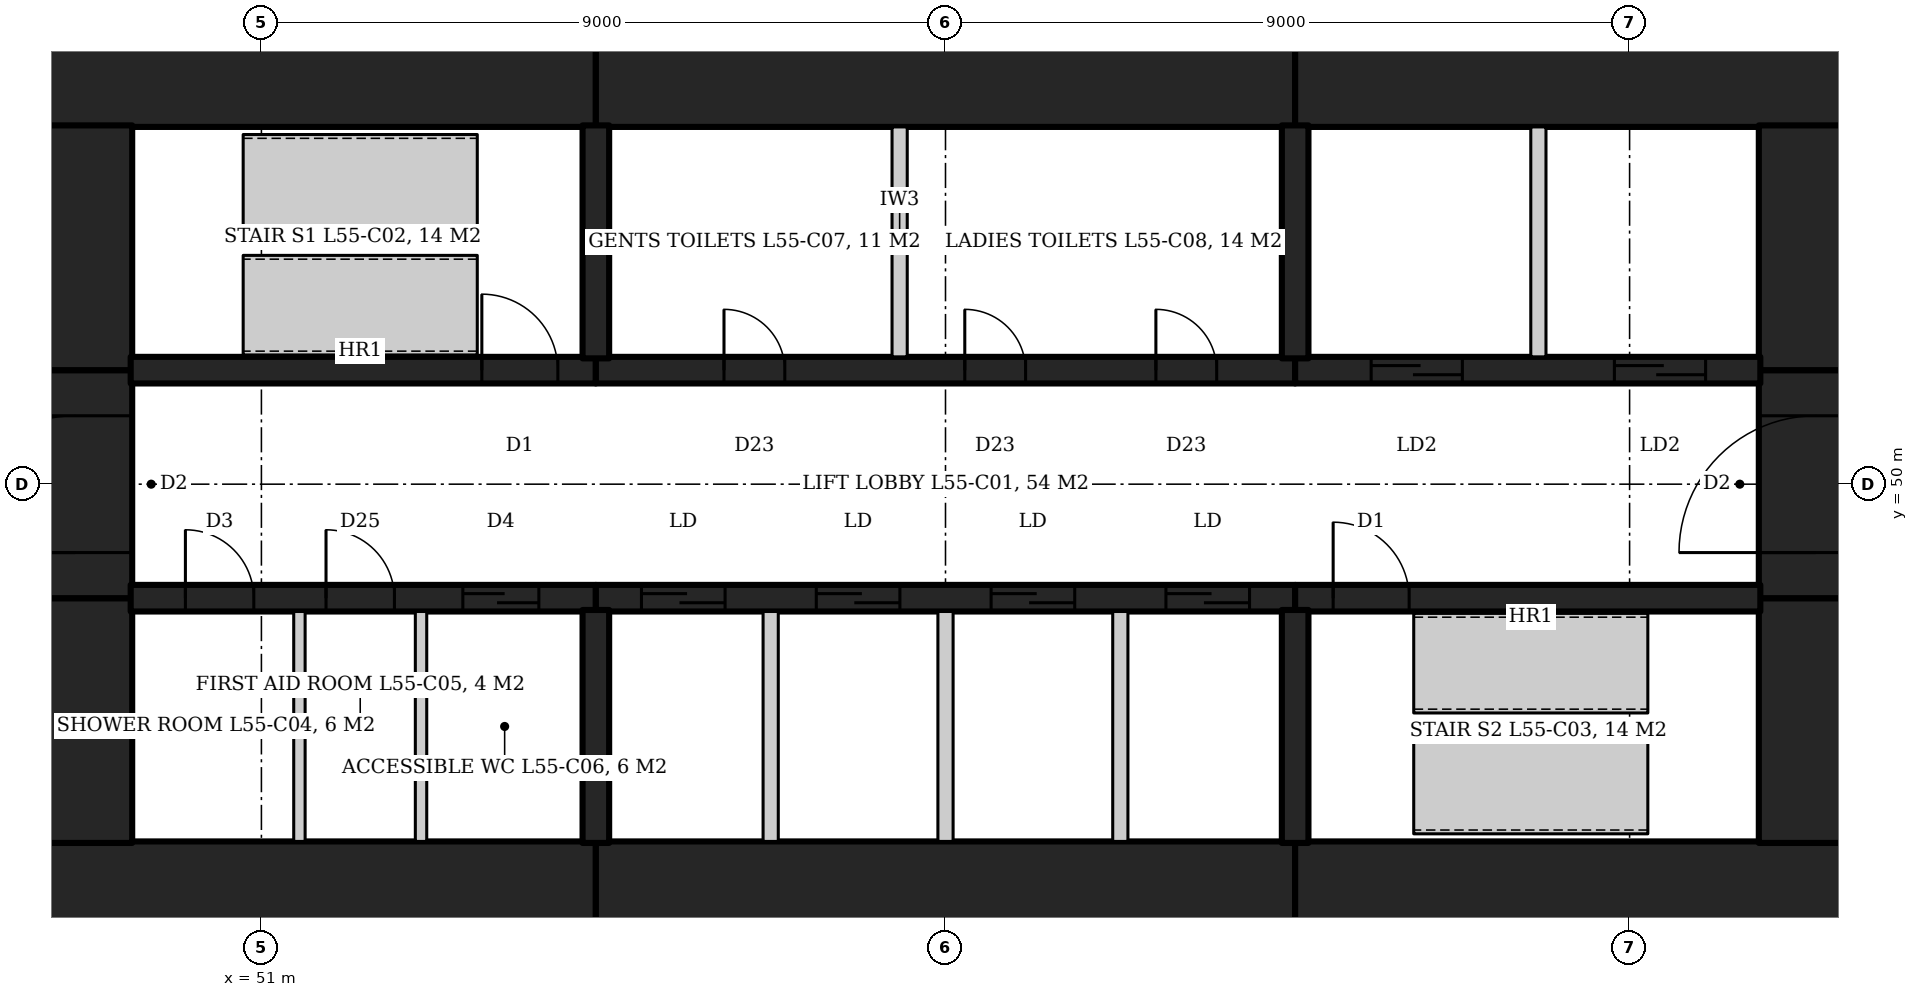
"""IFC4 building model, lengths in metres.
Left out: names, types, materials, properties, quantities, classifications, styles, units other than length and angle.
Written with IfcOpenShell. Run it as: python <this file> out.ifc"""

import sys

from ifc_helpers import new_model, si_unit, direction, frame, frame_2d, origin, place, context, subcontext, project, spatial, rectangle, extrude, element, fill, save


model = new_model("IFC4")
c1 = context("Model", 3, precision=1e-05, world=origin(), true_north=direction((0.0, 1.0)))
c2 = subcontext(c1, "Body", "Model", "MODEL_VIEW")
j1 = project(units=[si_unit("LENGTHUNIT", "METRE"), si_unit("PLANEANGLEUNIT", "RADIAN")], contexts=[c1])
p1 = place(None, origin())
s1 = spatial("IfcSite", under=j1, at=p1, CompositionType="ELEMENT")
p2 = place(p1, origin())
s2 = spatial("IfcBuilding", under=s1, at=p2, CompositionType="ELEMENT")
p3 = place(p2, frame((0.0, 0.0, 240.2)))
s3 = spatial("IfcBuildingStorey", under=s2, at=p3, CompositionType="ELEMENT", Elevation=240.2)
p4 = place(p3, frame((47.8, 55.45, 0.0), z_axis=(0.0, 0.0, 1.0), x_axis=(1.0, 0.0, 0.0)))
e1 = element("IfcWall", 1, at=p4, inside=s3, PredefinedType="SHEAR", context=c2, shape_type="SweptSolid", body=[
    extrude(rectangle(XDim=7.6, YDim=1.5, at=frame_2d((3.8, 0.0))), origin(), (0.0, 0.0, 1.0), 4.2),
])
p5 = place(p3, frame((55.4, 55.45, 0.0), z_axis=(0.0, 0.0, 1.0), x_axis=(1.0, 0.0, 0.0)))
e2 = element("IfcWall", 2, at=p5, inside=s3, PredefinedType="SHEAR", context=c2, shape_type="SweptSolid", body=[
    extrude(rectangle(XDim=9.2, YDim=1.5, at=frame_2d((4.6, 0.0))), origin(), (0.0, 0.0, 1.0), 4.2),
])
for number, where, z_axis, x_axis in (
    (3, (64.6, 55.45, 0.0), (0.0, 0.0, 1.0), (1.0, 0.0, 0.0)),
    (4, (47.8, 44.55, 0.0), (0.0, 0.0, 1.0), (1.0, 0.0, 0.0)),
):
    element("IfcWall", number, at=place(p3, frame(where, z_axis=z_axis, x_axis=x_axis)), inside=s3, PredefinedType="SHEAR", context=c2, shape_type="SweptSolid", body=[
        extrude(rectangle(XDim=7.6, YDim=1.5, at=frame_2d((3.8, 0.0))), origin(), (0.0, 0.0, 1.0), 4.2),
    ])
p6 = place(p3, frame((55.4, 44.55, 0.0), z_axis=(0.0, 0.0, 1.0), x_axis=(1.0, 0.0, 0.0)))
e5 = element("IfcWall", 5, at=p6, inside=s3, PredefinedType="SHEAR", context=c2, shape_type="SweptSolid", body=[
    extrude(rectangle(XDim=9.2, YDim=1.5, at=frame_2d((4.6, 0.0))), origin(), (0.0, 0.0, 1.0), 4.2),
])
p7 = place(p3, frame((64.6, 44.55, 0.0), z_axis=(0.0, 0.0, 1.0), x_axis=(1.0, 0.0, 0.0)))
e6 = element("IfcWall", 6, at=p7, inside=s3, PredefinedType="SHEAR", context=c2, shape_type="SweptSolid", body=[
    extrude(rectangle(XDim=7.6, YDim=1.5, at=frame_2d((3.8, 0.0))), origin(), (0.0, 0.0, 1.0), 4.2),
])
p8 = place(p3, frame((71.45, 45.28, 0.0), z_axis=(0.0, 0.0, 1.0), x_axis=(0.0, 1.0, 0.0)))
e7 = element("IfcWall", 7, at=p8, inside=s3, PredefinedType="SHEAR", context=c2, shape_type="SweptSolid", body=[
    extrude(rectangle(XDim=3.22, YDim=1.5, at=frame_2d((1.61, 0.0))), origin(), (0.0, 0.0, 1.0), 4.2),
])
p9 = place(p3, frame((71.45, 48.5, 0.0), z_axis=(0.0, 0.0, 1.0), x_axis=(0.0, 1.0, 0.0)))
e8 = element("IfcWall", 8, at=p9, inside=s3, PredefinedType="SHEAR", context=c2, shape_type="SweptSolid", body=[
    extrude(rectangle(XDim=3.0, YDim=1.5, at=frame_2d((1.5, 0.0))), origin(), (0.0, 0.0, 1.0), 4.2),
])
p10 = place(p9, frame((0.6, 0.0, 0.0)))
e9 = element("IfcOpeningElement", 9, at=p10, cuts=e8, PredefinedType="OPENING", context=c2, shape_type="SweptSolid", body=[
    extrude(rectangle(XDim=1.8, YDim=2.1, at=frame_2d((0.9, 1.05))), frame((0.0, 0.76, 0.0), z_axis=(0.0, -1.0, 0.0), x_axis=(1.0, 0.0, 0.0)), (0.0, 0.0, 1.0), 1.52),
])
for number, where, z_axis, x_axis in (
    (10, (71.45, 51.5, 0.0), (0.0, 0.0, 1.0), (0.0, 1.0, 0.0)),
    (11, (48.55, 45.28, 0.0), (0.0, 0.0, 1.0), (0.0, 1.0, 0.0)),
):
    element("IfcWall", number, at=place(p3, frame(where, z_axis=z_axis, x_axis=x_axis)), inside=s3, PredefinedType="SHEAR", context=c2, shape_type="SweptSolid", body=[
        extrude(rectangle(XDim=3.22, YDim=1.5, at=frame_2d((1.61, 0.0))), origin(), (0.0, 0.0, 1.0), 4.2),
    ])
p11 = place(p3, frame((48.55, 48.5, 0.0), z_axis=(0.0, 0.0, 1.0), x_axis=(0.0, 1.0, 0.0)))
e12 = element("IfcWall", 12, at=p11, inside=s3, PredefinedType="SHEAR", context=c2, shape_type="SweptSolid", body=[
    extrude(rectangle(XDim=3.0, YDim=1.5, at=frame_2d((1.5, 0.0))), origin(), (0.0, 0.0, 1.0), 4.2),
])
p12 = place(p11, frame((0.6, 0.0, 0.0)))
e13 = element("IfcOpeningElement", 13, at=p12, cuts=e12, PredefinedType="OPENING", context=c2, shape_type="SweptSolid", body=[
    extrude(rectangle(XDim=1.8, YDim=2.1, at=frame_2d((0.9, 1.05))), frame((0.0, 0.76, 0.0), z_axis=(0.0, -1.0, 0.0), x_axis=(1.0, 0.0, 0.0)), (0.0, 0.0, 1.0), 1.52),
])
p13 = place(p3, frame((48.55, 51.5, 0.0), z_axis=(0.0, 0.0, 1.0), x_axis=(0.0, 1.0, 0.0)))
e14 = element("IfcWall", 14, at=p13, inside=s3, PredefinedType="SHEAR", context=c2, shape_type="SweptSolid", body=[
    extrude(rectangle(XDim=3.22, YDim=1.5, at=frame_2d((1.61, 0.0))), origin(), (0.0, 0.0, 1.0), 4.2),
])
p14 = place(p3, frame((49.28, 51.5, 0.0), z_axis=(0.0, 0.0, 1.0), x_axis=(1.0, 0.0, 0.0)))
e15 = element("IfcWall", 15, at=p14, inside=s3, PredefinedType="SHEAR", context=c2, shape_type="SweptSolid", body=[
    extrude(rectangle(XDim=6.12, YDim=0.35, at=frame_2d((3.06, 0.0))), origin(), (0.0, 0.0, 1.0), 4.2),
])
p15 = place(p14, frame((4.62, 0.0, 0.0)))
e16 = element("IfcOpeningElement", 16, at=p15, cuts=e15, PredefinedType="OPENING", context=c2, shape_type="SweptSolid", body=[
    extrude(rectangle(XDim=1.0, YDim=2.1, at=frame_2d((0.5, 1.05))), frame((0.0, 0.185, 0.0), z_axis=(0.0, -1.0, 0.0), x_axis=(1.0, 0.0, 0.0)), (0.0, 0.0, 1.0), 0.37),
])
p16 = place(p3, frame((55.4, 51.5, 0.0), z_axis=(0.0, 0.0, 1.0), x_axis=(1.0, 0.0, 0.0)))
e17 = element("IfcWall", 17, at=p16, inside=s3, PredefinedType="SHEAR", context=c2, shape_type="SweptSolid", body=[
    extrude(rectangle(XDim=9.2, YDim=0.35, at=frame_2d((4.6, 0.0))), origin(), (0.0, 0.0, 1.0), 4.2),
])
p17 = place(p16, frame((1.686, 0.0, 0.0)))
e18 = element("IfcOpeningElement", 18, at=p17, cuts=e17, PredefinedType="OPENING", context=c2, shape_type="SweptSolid", body=[
    extrude(rectangle(XDim=0.8, YDim=2.1, at=frame_2d((0.4, 1.05))), frame((0.0, 0.185, 0.0), z_axis=(0.0, -1.0, 0.0), x_axis=(1.0, 0.0, 0.0)), (0.0, 0.0, 1.0), 0.37),
])
p18 = place(p16, frame((4.854, 0.0, 0.0)))
e19 = element("IfcOpeningElement", 19, at=p18, cuts=e17, PredefinedType="OPENING", context=c2, shape_type="SweptSolid", body=[
    extrude(rectangle(XDim=0.8, YDim=2.1, at=frame_2d((0.4, 1.05))), frame((0.0, 0.185, 0.0), z_axis=(0.0, -1.0, 0.0), x_axis=(1.0, 0.0, 0.0)), (0.0, 0.0, 1.0), 0.37),
])
p19 = place(p16, frame((7.368, 0.0, 0.0)))
e20 = element("IfcOpeningElement", 20, at=p19, cuts=e17, PredefinedType="OPENING", context=c2, shape_type="SweptSolid", body=[
    extrude(rectangle(XDim=0.8, YDim=2.1, at=frame_2d((0.4, 1.05))), frame((0.0, 0.185, 0.0), z_axis=(0.0, -1.0, 0.0), x_axis=(1.0, 0.0, 0.0)), (0.0, 0.0, 1.0), 0.37),
])
p20 = place(p3, frame((64.6, 51.5, 0.0), z_axis=(0.0, 0.0, 1.0), x_axis=(1.0, 0.0, 0.0)))
e21 = element("IfcWall", 21, at=p20, inside=s3, PredefinedType="SHEAR", context=c2, shape_type="SweptSolid", body=[
    extrude(rectangle(XDim=6.12, YDim=0.35, at=frame_2d((3.06, 0.0))), origin(), (0.0, 0.0, 1.0), 4.2),
])
p21 = place(p20, frame((1.0, 0.0, 0.0)))
e22 = element("IfcOpeningElement", 22, at=p21, cuts=e21, PredefinedType="OPENING", context=c2, shape_type="SweptSolid", body=[
    extrude(rectangle(XDim=1.2, YDim=2.1, at=frame_2d((0.6, 1.05))), frame((0.0, 0.185, 0.0), z_axis=(0.0, -1.0, 0.0), x_axis=(1.0, 0.0, 0.0)), (0.0, 0.0, 1.0), 0.37),
])
p22 = place(p20, frame((4.2, 0.0, 0.0)))
e23 = element("IfcOpeningElement", 23, at=p22, cuts=e21, PredefinedType="OPENING", context=c2, shape_type="SweptSolid", body=[
    extrude(rectangle(XDim=1.2, YDim=2.1, at=frame_2d((0.6, 1.05))), frame((0.0, 0.185, 0.0), z_axis=(0.0, -1.0, 0.0), x_axis=(1.0, 0.0, 0.0)), (0.0, 0.0, 1.0), 0.37),
])
p23 = place(p3, frame((49.28, 48.5, 0.0), z_axis=(0.0, 0.0, 1.0), x_axis=(1.0, 0.0, 0.0)))
e24 = element("IfcWall", 24, at=p23, inside=s3, PredefinedType="SHEAR", context=c2, shape_type="SweptSolid", body=[
    extrude(rectangle(XDim=6.12, YDim=0.35, at=frame_2d((3.06, 0.0))), origin(), (0.0, 0.0, 1.0), 4.2),
])
p24 = place(p23, frame((0.72, 0.0, 0.0)))
e25 = element("IfcOpeningElement", 25, at=p24, cuts=e24, PredefinedType="OPENING", context=c2, shape_type="SweptSolid", body=[
    extrude(rectangle(XDim=0.9, YDim=2.1, at=frame_2d((0.45, 1.05))), frame((0.0, 0.185, 0.0), z_axis=(0.0, -1.0, 0.0), x_axis=(1.0, 0.0, 0.0)), (0.0, 0.0, 1.0), 0.37),
])
p25 = place(p23, frame((2.57, 0.0, 0.0)))
e26 = element("IfcOpeningElement", 26, at=p25, cuts=e24, PredefinedType="OPENING", context=c2, shape_type="SweptSolid", body=[
    extrude(rectangle(XDim=0.9, YDim=2.1, at=frame_2d((0.45, 1.05))), frame((0.0, 0.185, 0.0), z_axis=(0.0, -1.0, 0.0), x_axis=(1.0, 0.0, 0.0)), (0.0, 0.0, 1.0), 0.37),
])
p26 = place(p23, frame((4.37, 0.0, 0.0)))
e27 = element("IfcOpeningElement", 27, at=p26, cuts=e24, PredefinedType="OPENING", context=c2, shape_type="SweptSolid", body=[
    extrude(rectangle(XDim=1.0, YDim=2.1, at=frame_2d((0.5, 1.05))), frame((0.0, 0.185, 0.0), z_axis=(0.0, -1.0, 0.0), x_axis=(1.0, 0.0, 0.0)), (0.0, 0.0, 1.0), 0.37),
])
p27 = place(p3, frame((55.4, 48.5, 0.0), z_axis=(0.0, 0.0, 1.0), x_axis=(1.0, 0.0, 0.0)))
e28 = element("IfcWall", 28, at=p27, inside=s3, PredefinedType="SHEAR", context=c2, shape_type="SweptSolid", body=[
    extrude(rectangle(XDim=9.2, YDim=0.35, at=frame_2d((4.6, 0.0))), origin(), (0.0, 0.0, 1.0), 4.2),
])
p28 = place(p27, frame((0.6, 0.0, 0.0)))
e29 = element("IfcOpeningElement", 29, at=p28, cuts=e28, PredefinedType="OPENING", context=c2, shape_type="SweptSolid", body=[
    extrude(rectangle(XDim=1.1, YDim=2.1, at=frame_2d((0.55, 1.05))), frame((0.0, 0.185, 0.0), z_axis=(0.0, -1.0, 0.0), x_axis=(1.0, 0.0, 0.0)), (0.0, 0.0, 1.0), 0.37),
])
p29 = place(p27, frame((2.9, 0.0, 0.0)))
e30 = element("IfcOpeningElement", 30, at=p29, cuts=e28, PredefinedType="OPENING", context=c2, shape_type="SweptSolid", body=[
    extrude(rectangle(XDim=1.1, YDim=2.1, at=frame_2d((0.55, 1.05))), frame((0.0, 0.185, 0.0), z_axis=(0.0, -1.0, 0.0), x_axis=(1.0, 0.0, 0.0)), (0.0, 0.0, 1.0), 0.37),
])
p30 = place(p27, frame((5.2, 0.0, 0.0)))
e31 = element("IfcOpeningElement", 31, at=p30, cuts=e28, PredefinedType="OPENING", context=c2, shape_type="SweptSolid", body=[
    extrude(rectangle(XDim=1.1, YDim=2.1, at=frame_2d((0.55, 1.05))), frame((0.0, 0.185, 0.0), z_axis=(0.0, -1.0, 0.0), x_axis=(1.0, 0.0, 0.0)), (0.0, 0.0, 1.0), 0.37),
])
p31 = place(p27, frame((7.5, 0.0, 0.0)))
e32 = element("IfcOpeningElement", 32, at=p31, cuts=e28, PredefinedType="OPENING", context=c2, shape_type="SweptSolid", body=[
    extrude(rectangle(XDim=1.1, YDim=2.1, at=frame_2d((0.55, 1.05))), frame((0.0, 0.185, 0.0), z_axis=(0.0, -1.0, 0.0), x_axis=(1.0, 0.0, 0.0)), (0.0, 0.0, 1.0), 0.37),
])
p32 = place(p3, frame((64.6, 48.5, 0.0), z_axis=(0.0, 0.0, 1.0), x_axis=(1.0, 0.0, 0.0)))
e33 = element("IfcWall", 33, at=p32, inside=s3, PredefinedType="SHEAR", context=c2, shape_type="SweptSolid", body=[
    extrude(rectangle(XDim=6.12, YDim=0.35, at=frame_2d((3.06, 0.0))), origin(), (0.0, 0.0, 1.0), 4.2),
])
p33 = place(p32, frame((0.5, 0.0, 0.0)))
e34 = element("IfcOpeningElement", 34, at=p33, cuts=e33, PredefinedType="OPENING", context=c2, shape_type="SweptSolid", body=[
    extrude(rectangle(XDim=1.0, YDim=2.1, at=frame_2d((0.5, 1.05))), frame((0.0, 0.185, 0.0), z_axis=(0.0, -1.0, 0.0), x_axis=(1.0, 0.0, 0.0)), (0.0, 0.0, 1.0), 0.37),
])
for number, where, z_axis, x_axis in (
    (35, (55.4, 51.655, 0.0), (0.0, 0.0, 1.0), (0.0, 1.0, 0.0)),
    (36, (64.6, 51.655, 0.0), (0.0, 0.0, 1.0), (0.0, 1.0, 0.0)),
    (37, (55.4, 48.345, 0.0), (0.0, 0.0, 1.0), (0.0, -1.0, 0.0)),
    (38, (64.6, 48.345, 0.0), (0.0, 0.0, 1.0), (0.0, -1.0, 0.0)),
):
    element("IfcWall", number, at=place(p3, frame(where, z_axis=z_axis, x_axis=x_axis)), inside=s3, PredefinedType="SHEAR", context=c2, shape_type="SweptSolid", body=[
        extrude(rectangle(XDim=3.065, YDim=0.35, at=frame_2d((1.532, 0.0))), origin(), (0.0, 0.0, 1.0), 4.2),
    ])
for number, where, z_axis, x_axis in (
    (39, (57.7, 45.3, 0.0), (0.0, 0.0, 1.0), (0.0, 1.0, 0.0)),
    (40, (60.0, 45.3, 0.0), (0.0, 0.0, 1.0), (0.0, 1.0, 0.0)),
    (41, (62.3, 45.3, 0.0), (0.0, 0.0, 1.0), (0.0, 1.0, 0.0)),
    (42, (67.8, 51.675, 0.0), (0.0, 0.0, 1.0), (0.0, 1.0, 0.0)),
):
    element("IfcWall", number, at=place(p3, frame(where, z_axis=z_axis, x_axis=x_axis)), inside=s3, PredefinedType="PARTITIONING", context=c2, shape_type="SweptSolid", body=[
        extrude(rectangle(XDim=3.025, YDim=0.2, at=frame_2d((1.512, 0.0))), origin(), (0.0, 0.0, 1.0), 4.2),
    ])
for number, where, z_axis, x_axis in (
    (43, (51.5, 45.3, 0.0), (0.0, 0.0, 1.0), (0.0, 1.0, 0.0)),
    (44, (53.1, 45.3, 0.0), (0.0, 0.0, 1.0), (0.0, 1.0, 0.0)),
):
    element("IfcWall", number, at=place(p3, frame(where, z_axis=z_axis, x_axis=x_axis)), inside=s3, PredefinedType="PARTITIONING", context=c2, shape_type="SweptSolid", body=[
        extrude(rectangle(XDim=3.025, YDim=0.15, at=frame_2d((1.512, 0.0))), origin(), (0.0, 0.0, 1.0), 4.04),
    ])
p34 = place(p3, frame((59.396, 51.675, 0.0), z_axis=(0.0, 0.0, 1.0), x_axis=(0.0, 1.0, 0.0)))
e45 = element("IfcWall", 45, at=p34, inside=s3, PredefinedType="PARTITIONING", context=c2, shape_type="SweptSolid", body=[
    extrude(rectangle(XDim=3.025, YDim=0.2, at=frame_2d((1.512, 0.0))), origin(), (0.0, 0.0, 1.0), 4.04),
])
p35 = place(p15, origin())
e46 = element("IfcDoor", 46, at=p35, inside=s3, OperationType="SINGLE_SWING_LEFT", PredefinedType="DOOR", context=c2, shape_type="SweptSolid", body=[
    extrude(rectangle(XDim=1.0, YDim=2.1, at=frame_2d((0.5, 1.05))), frame((0.0, 0.025, 0.0), z_axis=(0.0, -1.0, 0.0), x_axis=(1.0, 0.0, 0.0)), (0.0, 0.0, 1.0), 0.05),
])
fill(e16, e46)
p36 = place(p33, origin())
e47 = element("IfcDoor", 47, at=p36, inside=s3, OperationType="SINGLE_SWING_LEFT", PredefinedType="DOOR", context=c2, shape_type="SweptSolid", body=[
    extrude(rectangle(XDim=1.0, YDim=2.1, at=frame_2d((0.5, 1.05))), frame((0.0, 0.025, 0.0), z_axis=(0.0, -1.0, 0.0), x_axis=(1.0, 0.0, 0.0)), (0.0, 0.0, 1.0), 0.05),
])
fill(e34, e47)
p37 = place(p21, origin())
e48 = element("IfcDoor", 48, at=p37, inside=s3, OperationType="SLIDING_TO_LEFT", PredefinedType="DOOR", context=c2, shape_type="SweptSolid", body=[
    extrude(rectangle(XDim=1.2, YDim=2.1, at=frame_2d((0.6, 1.05))), frame((0.0, 0.025, 0.0), z_axis=(0.0, -1.0, 0.0), x_axis=(1.0, 0.0, 0.0)), (0.0, 0.0, 1.0), 0.05),
])
fill(e22, e48)
p38 = place(p22, origin())
e49 = element("IfcDoor", 49, at=p38, inside=s3, OperationType="SLIDING_TO_LEFT", PredefinedType="DOOR", context=c2, shape_type="SweptSolid", body=[
    extrude(rectangle(XDim=1.2, YDim=2.1, at=frame_2d((0.6, 1.05))), frame((0.0, 0.025, 0.0), z_axis=(0.0, -1.0, 0.0), x_axis=(1.0, 0.0, 0.0)), (0.0, 0.0, 1.0), 0.05),
])
fill(e23, e49)
p39 = place(p28, origin())
e50 = element("IfcDoor", 50, at=p39, inside=s3, OperationType="SLIDING_TO_LEFT", PredefinedType="DOOR", context=c2, shape_type="SweptSolid", body=[
    extrude(rectangle(XDim=1.1, YDim=2.1, at=frame_2d((0.55, 1.05))), frame((0.0, 0.025, 0.0), z_axis=(0.0, -1.0, 0.0), x_axis=(1.0, 0.0, 0.0)), (0.0, 0.0, 1.0), 0.05),
])
fill(e29, e50)
p40 = place(p29, origin())
e51 = element("IfcDoor", 51, at=p40, inside=s3, OperationType="SLIDING_TO_LEFT", PredefinedType="DOOR", context=c2, shape_type="SweptSolid", body=[
    extrude(rectangle(XDim=1.1, YDim=2.1, at=frame_2d((0.55, 1.05))), frame((0.0, 0.025, 0.0), z_axis=(0.0, -1.0, 0.0), x_axis=(1.0, 0.0, 0.0)), (0.0, 0.0, 1.0), 0.05),
])
fill(e30, e51)
p41 = place(p30, origin())
e52 = element("IfcDoor", 52, at=p41, inside=s3, OperationType="SLIDING_TO_LEFT", PredefinedType="DOOR", context=c2, shape_type="SweptSolid", body=[
    extrude(rectangle(XDim=1.1, YDim=2.1, at=frame_2d((0.55, 1.05))), frame((0.0, 0.025, 0.0), z_axis=(0.0, -1.0, 0.0), x_axis=(1.0, 0.0, 0.0)), (0.0, 0.0, 1.0), 0.05),
])
fill(e31, e52)
p42 = place(p31, origin())
e53 = element("IfcDoor", 53, at=p42, inside=s3, OperationType="SLIDING_TO_LEFT", PredefinedType="DOOR", context=c2, shape_type="SweptSolid", body=[
    extrude(rectangle(XDim=1.1, YDim=2.1, at=frame_2d((0.55, 1.05))), frame((0.0, 0.025, 0.0), z_axis=(0.0, -1.0, 0.0), x_axis=(1.0, 0.0, 0.0)), (0.0, 0.0, 1.0), 0.05),
])
fill(e32, e53)
p43 = place(p24, origin())
e54 = element("IfcDoor", 54, at=p43, inside=s3, OperationType="SINGLE_SWING_RIGHT", PredefinedType="DOOR", context=c2, shape_type="SweptSolid", body=[
    extrude(rectangle(XDim=0.9, YDim=2.1, at=frame_2d((0.45, 1.05))), frame((0.0, 0.025, 0.0), z_axis=(0.0, -1.0, 0.0), x_axis=(1.0, 0.0, 0.0)), (0.0, 0.0, 1.0), 0.05),
])
fill(e25, e54)
p44 = place(p25, origin())
e55 = element("IfcDoor", 55, at=p44, inside=s3, OperationType="SINGLE_SWING_RIGHT", PredefinedType="DOOR", context=c2, shape_type="SweptSolid", body=[
    extrude(rectangle(XDim=0.9, YDim=2.1, at=frame_2d((0.45, 1.05))), frame((0.0, 0.025, 0.0), z_axis=(0.0, -1.0, 0.0), x_axis=(1.0, 0.0, 0.0)), (0.0, 0.0, 1.0), 0.05),
])
fill(e26, e55)
p45 = place(p26, origin())
e56 = element("IfcDoor", 56, at=p45, inside=s3, OperationType="SLIDING_TO_LEFT", PredefinedType="DOOR", context=c2, shape_type="SweptSolid", body=[
    extrude(rectangle(XDim=1.0, YDim=2.1, at=frame_2d((0.5, 1.05))), frame((0.0, 0.025, 0.0), z_axis=(0.0, -1.0, 0.0), x_axis=(1.0, 0.0, 0.0)), (0.0, 0.0, 1.0), 0.05),
])
fill(e27, e56)
p46 = place(p10, origin())
e57 = element("IfcDoor", 57, at=p46, inside=s3, OperationType="DOUBLE_DOOR_DOUBLE_SWING", PredefinedType="DOOR", context=c2, shape_type="SweptSolid", body=[
    extrude(rectangle(XDim=1.8, YDim=2.1, at=frame_2d((0.9, 1.05))), frame((0.0, 0.025, 0.0), z_axis=(0.0, -1.0, 0.0), x_axis=(1.0, 0.0, 0.0)), (0.0, 0.0, 1.0), 0.05),
])
fill(e9, e57)
p47 = place(p12, origin())
e58 = element("IfcDoor", 58, at=p47, inside=s3, OperationType="DOUBLE_DOOR_DOUBLE_SWING", PredefinedType="DOOR", context=c2, shape_type="SweptSolid", body=[
    extrude(rectangle(XDim=1.8, YDim=2.1, at=frame_2d((0.9, 1.05))), frame((0.0, 0.025, 0.0), z_axis=(0.0, -1.0, 0.0), x_axis=(1.0, 0.0, 0.0)), (0.0, 0.0, 1.0), 0.05),
])
fill(e13, e58)
p48 = place(p17, origin())
e59 = element("IfcDoor", 59, at=p48, inside=s3, OperationType="SINGLE_SWING_LEFT", PredefinedType="DOOR", context=c2, shape_type="SweptSolid", body=[
    extrude(rectangle(XDim=0.8, YDim=2.1, at=frame_2d((0.4, 1.05))), frame((0.0, 0.025, 0.0), z_axis=(0.0, -1.0, 0.0), x_axis=(1.0, 0.0, 0.0)), (0.0, 0.0, 1.0), 0.05),
])
fill(e18, e59)
p49 = place(p18, origin())
e60 = element("IfcDoor", 60, at=p49, inside=s3, OperationType="SINGLE_SWING_LEFT", PredefinedType="DOOR", context=c2, shape_type="SweptSolid", body=[
    extrude(rectangle(XDim=0.8, YDim=2.1, at=frame_2d((0.4, 1.05))), frame((0.0, 0.025, 0.0), z_axis=(0.0, -1.0, 0.0), x_axis=(1.0, 0.0, 0.0)), (0.0, 0.0, 1.0), 0.05),
])
fill(e19, e60)
p50 = place(p19, origin())
e61 = element("IfcDoor", 61, at=p50, inside=s3, OperationType="SINGLE_SWING_LEFT", PredefinedType="DOOR", context=c2, shape_type="SweptSolid", body=[
    extrude(rectangle(XDim=0.8, YDim=2.1, at=frame_2d((0.4, 1.05))), frame((0.0, 0.025, 0.0), z_axis=(0.0, -1.0, 0.0), x_axis=(1.0, 0.0, 0.0)), (0.0, 0.0, 1.0), 0.05),
])
fill(e20, e61)
save(model, sys.argv[1])
